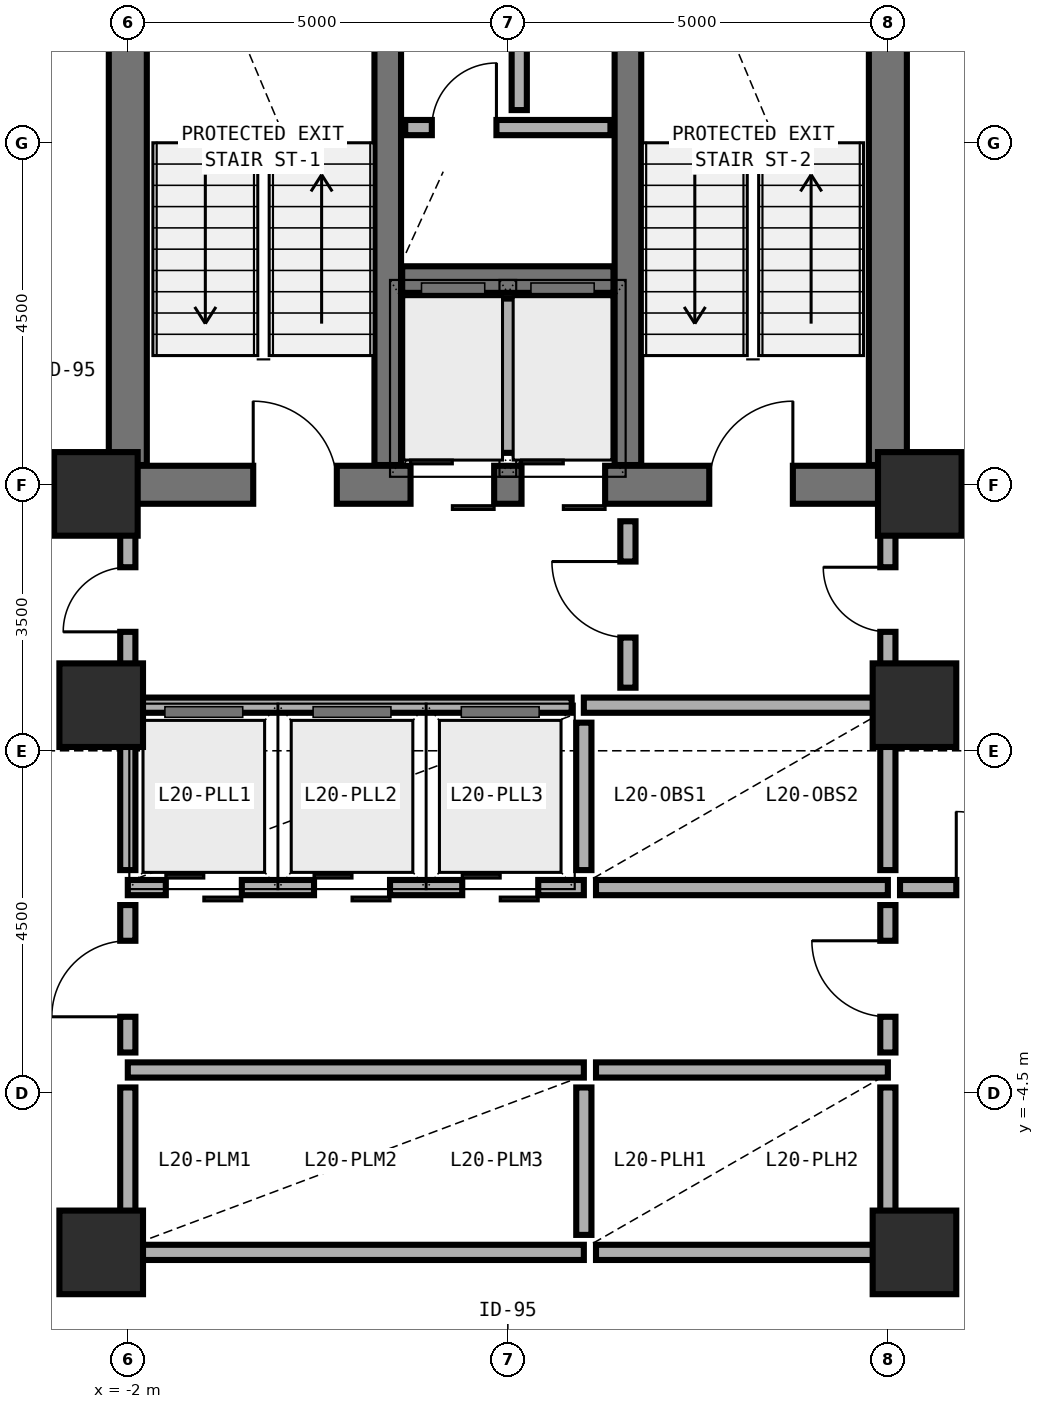
"""IFC4 building model, lengths in metres.
Left out: names, types, materials, properties, quantities, classifications, styles, units other than length and angle.
Written with IfcOpenShell. Run it as: python <this file> out.ifc"""

import sys

from ifc_helpers import new_model, si_unit, direction, frame, frame_2d, origin, origin_2d, place, context, subcontext, project, spatial, rectangle, extrude, element, fill, save


model = new_model("IFC4")
c1 = context("Model", 3, precision=1e-05, world=origin(), true_north=direction((0.0, 1.0)))
c2 = subcontext(c1, "Body", "Model", "MODEL_VIEW")
j1 = project(units=[si_unit("LENGTHUNIT", "METRE"), si_unit("PLANEANGLEUNIT", "RADIAN")], contexts=[c1])
p1 = place(None, origin())
s1 = spatial("IfcSite", under=j1, at=p1, CompositionType="ELEMENT")
p2 = place(p1, origin())
s2 = spatial("IfcBuilding", under=s1, at=p2, CompositionType="ELEMENT")
p3 = place(p2, frame((0.0, 0.0, 83.7)))
s3 = spatial("IfcBuildingStorey", under=s2, at=p3, CompositionType="ELEMENT", Elevation=83.7)
p4 = place(p3, frame((-2.0, 3.5, 0.0), z_axis=(0.0, 0.0, 1.0), x_axis=(1.0, 0.0, 0.0)))
e1 = element("IfcWall", 1, at=p4, inside=s3, PredefinedType="SHEAR", context=c2, shape_type="SweptSolid", body=[
    extrude(rectangle(XDim=10.0, YDim=0.5, at=frame_2d((5.0, 0.0))), origin(), (0.0, 0.0, 1.0), 3.892),
])
p5 = place(p4, frame((1.65, 0.0, 0.0)))
e2 = element("IfcOpeningElement", 2, at=p5, cuts=e1, PredefinedType="OPENING", context=c2, shape_type="SweptSolid", body=[
    extrude(rectangle(XDim=1.1, YDim=2.15, at=frame_2d((0.55, 1.075))), frame((0.0, 0.26, 0.0), z_axis=(0.0, -1.0, 0.0), x_axis=(1.0, 0.0, 0.0)), (0.0, 0.0, 1.0), 0.52),
])
p6 = place(p4, frame((7.65, 0.0, 0.0)))
e3 = element("IfcOpeningElement", 3, at=p6, cuts=e1, PredefinedType="OPENING", context=c2, shape_type="SweptSolid", body=[
    extrude(rectangle(XDim=1.1, YDim=2.15, at=frame_2d((0.55, 1.075))), frame((0.0, 0.26, 0.0), z_axis=(0.0, -1.0, 0.0), x_axis=(1.0, 0.0, 0.0)), (0.0, 0.0, 1.0), 0.52),
])
p7 = place(p4, frame((3.72, 0.0, 0.0)))
e4 = element("IfcOpeningElement", 4, at=p7, cuts=e1, PredefinedType="OPENING", context=c2, shape_type="SweptSolid", body=[
    extrude(rectangle(XDim=1.1, YDim=2.2, at=frame_2d((0.55, 1.1))), frame((0.0, 0.26, 0.0), z_axis=(0.0, -1.0, 0.0), x_axis=(1.0, 0.0, 0.0)), (0.0, 0.0, 1.0), 0.52),
])
p8 = place(p4, frame((5.18, 0.0, 0.0)))
e5 = element("IfcOpeningElement", 5, at=p8, cuts=e1, PredefinedType="OPENING", context=c2, shape_type="SweptSolid", body=[
    extrude(rectangle(XDim=1.1, YDim=2.2, at=frame_2d((0.55, 1.1))), frame((0.0, 0.26, 0.0), z_axis=(0.0, -1.0, 0.0), x_axis=(1.0, 0.0, 0.0)), (0.0, 0.0, 1.0), 0.52),
])
for number, where, z_axis, x_axis in (
    (6, (-2.0, 3.76, 0.0), (0.0, 0.0, 1.0), (0.0, 1.0, 0.0)),
    (7, (8.0, 3.76, 0.0), (0.0, 0.0, 1.0), (0.0, 1.0, 0.0)),
):
    element("IfcWall", number, at=place(p3, frame(where, z_axis=z_axis, x_axis=x_axis)), inside=s3, PredefinedType="SHEAR", context=c2, shape_type="SweptSolid", body=[
        extrude(rectangle(XDim=8.48, YDim=0.5, at=frame_2d((4.24, 0.0))), origin(), (0.0, 0.0, 1.0), 3.892),
    ])
for number, where, z_axis, x_axis in (
    (8, (1.42, 3.76, 0.0), (0.0, 0.0, 1.0), (0.0, 1.0, 0.0)),
    (9, (4.58, 3.76, 0.0), (0.0, 0.0, 1.0), (0.0, 1.0, 0.0)),
):
    element("IfcWall", number, at=place(p3, frame(where, z_axis=z_axis, x_axis=x_axis)), inside=s3, PredefinedType="SHEAR", context=c2, shape_type="SweptSolid", body=[
        extrude(rectangle(XDim=8.48, YDim=0.35, at=frame_2d((4.24, 0.0))), origin(), (0.0, 0.0, 1.0), 3.892),
    ])
p9 = place(p3, frame((1.61, 6.2, 0.0), z_axis=(0.0, 0.0, 1.0), x_axis=(1.0, 0.0, 0.0)))
e10 = element("IfcWall", 10, at=p9, inside=s3, PredefinedType="SHEAR", context=c2, shape_type="SweptSolid", body=[
    extrude(rectangle(XDim=2.78, YDim=0.35, at=frame_2d((1.39, 0.0))), origin(), (0.0, 0.0, 1.0), 3.892),
])
for number, where, z_axis, x_axis in (
    (11, (-2.42, 3.38, 0.0), (0.0, 0.0, 1.0), (1.0, 0.0, 0.0)),
    (12, (8.42, 3.38, 0.0), (0.0, 0.0, 1.0), (1.0, 0.0, 0.0)),
    (13, (-2.35, 0.6, 0.0), (0.0, 0.0, 1.0), (1.0, 0.0, 0.0)),
    (14, (8.35, 0.6, 0.0), (0.0, 0.0, 1.0), (1.0, 0.0, 0.0)),
    (15, (-2.35, -6.6, 0.0), (0.0, 0.0, 1.0), (1.0, 0.0, 0.0)),
    (16, (8.35, -6.6, 0.0), (0.0, 0.0, 1.0), (1.0, 0.0, 0.0)),
):
    element("IfcColumn", number, at=place(p3, frame(where, z_axis=z_axis, x_axis=x_axis)), inside=s3, PredefinedType="COLUMN", context=c2, shape_type="SweptSolid", body=[
        extrude(rectangle(XDim=1.1, YDim=1.1, at=origin_2d()), origin(), (0.0, 0.0, 1.0), 3.875),
    ])
p10 = place(p3, frame((3.0, 3.92, 0.0), z_axis=(0.0, 0.0, 1.0), x_axis=(0.0, 1.0, 0.0)))
e17 = element("IfcWall", 17, at=p10, inside=s3, PredefinedType="SOLIDWALL", context=c2, shape_type="SweptSolid", body=[
    extrude(rectangle(XDim=2.03, YDim=0.2, at=frame_2d((1.015, 0.0))), origin(), (0.0, 0.0, 1.0), 3.64),
])
p11 = place(p3, frame((4.0, 0.6, 0.0), z_axis=(0.0, 0.0, 1.0), x_axis=(1.0, 0.0, 0.0)))
e18 = element("IfcWall", 18, at=p11, inside=s3, PredefinedType="SOLIDWALL", context=c2, shape_type="SweptSolid", body=[
    extrude(rectangle(XDim=3.88, YDim=0.2, at=frame_2d((1.94, 0.0))), origin(), (0.0, 0.0, 1.0), 3.172),
])
p12 = place(p3, frame((-2.0, -1.8, 0.0), z_axis=(0.0, 0.0, 1.0), x_axis=(1.0, 0.0, 0.0)))
e19 = element("IfcWall", 19, at=p12, inside=s3, PredefinedType="SOLIDWALL", context=c2, shape_type="SweptSolid", body=[
    extrude(rectangle(XDim=6.0, YDim=0.2, at=frame_2d((3.0, 0.0))), origin(), (0.0, 0.0, 1.0), 3.64),
])
p13 = place(p12, frame((0.5, 0.0, 0.0)))
e20 = element("IfcOpeningElement", 20, at=p13, cuts=e19, PredefinedType="OPENING", context=c2, shape_type="SweptSolid", body=[
    extrude(rectangle(XDim=1.0, YDim=2.2, at=frame_2d((0.5, 1.1))), frame((0.0, 0.11, 0.0), z_axis=(0.0, -1.0, 0.0), x_axis=(1.0, 0.0, 0.0)), (0.0, 0.0, 1.0), 0.22),
])
p14 = place(p12, frame((2.45, 0.0, 0.0)))
e21 = element("IfcOpeningElement", 21, at=p14, cuts=e19, PredefinedType="OPENING", context=c2, shape_type="SweptSolid", body=[
    extrude(rectangle(XDim=1.0, YDim=2.2, at=frame_2d((0.5, 1.1))), frame((0.0, 0.11, 0.0), z_axis=(0.0, -1.0, 0.0), x_axis=(1.0, 0.0, 0.0)), (0.0, 0.0, 1.0), 0.22),
])
p15 = place(p12, frame((4.4, 0.0, 0.0)))
e22 = element("IfcOpeningElement", 22, at=p15, cuts=e19, PredefinedType="OPENING", context=c2, shape_type="SweptSolid", body=[
    extrude(rectangle(XDim=1.0, YDim=2.2, at=frame_2d((0.5, 1.1))), frame((0.0, 0.11, 0.0), z_axis=(0.0, -1.0, 0.0), x_axis=(1.0, 0.0, 0.0)), (0.0, 0.0, 1.0), 0.22),
])
p16 = place(p3, frame((-2.0, -1.57, 0.0), z_axis=(0.0, 0.0, 1.0), x_axis=(0.0, 1.0, 0.0)))
e23 = element("IfcWall", 23, at=p16, inside=s3, PredefinedType="SOLIDWALL", context=c2, shape_type="SweptSolid", body=[
    extrude(rectangle(XDim=2.05, YDim=0.2, at=frame_2d((1.025, 0.0))), origin(), (0.0, 0.0, 1.0), 3.022),
])
p17 = place(p3, frame((4.16, -1.8, 0.0), z_axis=(0.0, 0.0, 1.0), x_axis=(1.0, 0.0, 0.0)))
e24 = element("IfcWall", 24, at=p17, inside=s3, PredefinedType="SOLIDWALL", context=c2, shape_type="SweptSolid", body=[
    extrude(rectangle(XDim=3.84, YDim=0.2, at=frame_2d((1.92, 0.0))), origin(), (0.0, 0.0, 1.0), 3.64),
])
p18 = place(p3, frame((4.0, -1.57, 0.0), z_axis=(0.0, 0.0, 1.0), x_axis=(0.0, 1.0, 0.0)))
e25 = element("IfcWall", 25, at=p18, inside=s3, PredefinedType="SOLIDWALL", context=c2, shape_type="SweptSolid", body=[
    extrude(rectangle(XDim=1.94, YDim=0.2, at=frame_2d((0.97, 0.0))), origin(), (0.0, 0.0, 1.0), 3.64),
])
p19 = place(p3, frame((8.0, -1.57, 0.0), z_axis=(0.0, 0.0, 1.0), x_axis=(0.0, 1.0, 0.0)))
e26 = element("IfcWall", 26, at=p19, inside=s3, PredefinedType="SOLIDWALL", context=c2, shape_type="SweptSolid", body=[
    extrude(rectangle(XDim=2.05, YDim=0.2, at=frame_2d((1.025, 0.0))), origin(), (0.0, 0.0, 1.0), 3.072),
])
p20 = place(p3, frame((-2.0, -4.2, 0.0), z_axis=(0.0, 0.0, 1.0), x_axis=(1.0, 0.0, 0.0)))
e27 = element("IfcWall", 27, at=p20, inside=s3, PredefinedType="SOLIDWALL", context=c2, shape_type="SweptSolid", body=[
    extrude(rectangle(XDim=6.0, YDim=0.2, at=frame_2d((3.0, 0.0))), origin(), (0.0, 0.0, 1.0), 3.64),
])
p21 = place(p3, frame((-2.0, -6.6, 0.0), z_axis=(0.0, 0.0, 1.0), x_axis=(1.0, 0.0, 0.0)))
e28 = element("IfcWall", 28, at=p21, inside=s3, PredefinedType="SOLIDWALL", context=c2, shape_type="SweptSolid", body=[
    extrude(rectangle(XDim=6.0, YDim=0.2, at=frame_2d((3.0, 0.0))), origin(), (0.0, 0.0, 1.0), 3.172),
])
p22 = place(p3, frame((-2.0, -6.37, 0.0), z_axis=(0.0, 0.0, 1.0), x_axis=(0.0, 1.0, 0.0)))
e29 = element("IfcWall", 29, at=p22, inside=s3, PredefinedType="SOLIDWALL", context=c2, shape_type="SweptSolid", body=[
    extrude(rectangle(XDim=1.94, YDim=0.2, at=frame_2d((0.97, 0.0))), origin(), (0.0, 0.0, 1.0), 3.022),
])
p23 = place(p3, frame((4.16, -4.2, 0.0), z_axis=(0.0, 0.0, 1.0), x_axis=(1.0, 0.0, 0.0)))
e30 = element("IfcWall", 30, at=p23, inside=s3, PredefinedType="SOLIDWALL", context=c2, shape_type="SweptSolid", body=[
    extrude(rectangle(XDim=3.84, YDim=0.2, at=frame_2d((1.92, 0.0))), origin(), (0.0, 0.0, 1.0), 3.64),
])
p24 = place(p3, frame((4.16, -6.6, 0.0), z_axis=(0.0, 0.0, 1.0), x_axis=(1.0, 0.0, 0.0)))
e31 = element("IfcWall", 31, at=p24, inside=s3, PredefinedType="SOLIDWALL", context=c2, shape_type="SweptSolid", body=[
    extrude(rectangle(XDim=3.84, YDim=0.2, at=frame_2d((1.92, 0.0))), origin(), (0.0, 0.0, 1.0), 3.172),
])
p25 = place(p3, frame((4.0, -6.37, 0.0), z_axis=(0.0, 0.0, 1.0), x_axis=(0.0, 1.0, 0.0)))
e32 = element("IfcWall", 32, at=p25, inside=s3, PredefinedType="SOLIDWALL", context=c2, shape_type="SweptSolid", body=[
    extrude(rectangle(XDim=1.94, YDim=0.2, at=frame_2d((0.97, 0.0))), origin(), (0.0, 0.0, 1.0), 3.64),
])
p26 = place(p3, frame((8.0, -6.37, 0.0), z_axis=(0.0, 0.0, 1.0), x_axis=(0.0, 1.0, 0.0)))
e33 = element("IfcWall", 33, at=p26, inside=s3, PredefinedType="SOLIDWALL", context=c2, shape_type="SweptSolid", body=[
    extrude(rectangle(XDim=1.94, YDim=0.2, at=frame_2d((0.97, 0.0))), origin(), (0.0, 0.0, 1.0), 3.072),
])
p27 = place(p3, frame((1.65, 8.2, 0.0), z_axis=(0.0, 0.0, 1.0), x_axis=(1.0, 0.0, 0.0)))
e34 = element("IfcWall", 34, at=p27, inside=s3, PredefinedType="MOVABLE", context=c2, shape_type="SweptSolid", body=[
    extrude(rectangle(XDim=2.7, YDim=0.2, at=frame_2d((1.35, 0.0))), origin(), (0.0, 0.0, 1.0), 3.64),
])
p28 = place(p27, frame((0.35, 0.0, 0.0)))
e35 = element("IfcOpeningElement", 35, at=p28, cuts=e34, PredefinedType="OPENING", context=c2, shape_type="SweptSolid", body=[
    extrude(rectangle(XDim=0.85, YDim=2.1, at=frame_2d((0.425, 1.05))), frame((0.0, 0.11, 0.0), z_axis=(0.0, -1.0, 0.0), x_axis=(1.0, 0.0, 0.0)), (0.0, 0.0, 1.0), 0.22),
])
p29 = place(p3, frame((3.15, 8.43, 0.0), z_axis=(0.0, 0.0, 1.0), x_axis=(0.0, 1.0, 0.0)))
e36 = element("IfcWall", 36, at=p29, inside=s3, PredefinedType="MOVABLE", context=c2, shape_type="SweptSolid", body=[
    extrude(rectangle(XDim=3.67, YDim=0.2, at=frame_2d((1.835, 0.0))), origin(), (0.0, 0.0, 1.0), 3.64),
])
p30 = place(p29, frame((1.34, 0.0, 0.0)))
e37 = element("IfcOpeningElement", 37, at=p30, cuts=e36, PredefinedType="OPENING", context=c2, shape_type="SweptSolid", body=[
    extrude(rectangle(XDim=0.85, YDim=2.1, at=frame_2d((0.425, 1.05))), frame((0.0, 0.11, 0.0), z_axis=(0.0, -1.0, 0.0), x_axis=(1.0, 0.0, 0.0)), (0.0, 0.0, 1.0), 0.22),
])
p31 = place(p3, frame((4.58, 0.83, 0.0), z_axis=(0.0, 0.0, 1.0), x_axis=(0.0, 1.0, 0.0)))
e38 = element("IfcWall", 38, at=p31, inside=s3, PredefinedType="MOVABLE", context=c2, shape_type="SweptSolid", body=[
    extrude(rectangle(XDim=2.19, YDim=0.2, at=frame_2d((1.095, 0.0))), origin(), (0.0, 0.0, 1.0), 3.64),
])
p32 = place(p31, frame((0.66, 0.0, 0.0)))
e39 = element("IfcOpeningElement", 39, at=p32, cuts=e38, PredefinedType="OPENING", context=c2, shape_type="SweptSolid", body=[
    extrude(rectangle(XDim=1.0, YDim=2.1, at=frame_2d((0.5, 1.05))), frame((0.0, 0.11, 0.0), z_axis=(0.0, -1.0, 0.0), x_axis=(1.0, 0.0, 0.0)), (0.0, 0.0, 1.0), 0.22),
])
p33 = place(p3, frame((-2.0, 0.72, 0.0), z_axis=(0.0, 0.0, 1.0), x_axis=(0.0, 1.0, 0.0)))
e40 = element("IfcWall", 40, at=p33, inside=s3, PredefinedType="MOVABLE", context=c2, shape_type="SweptSolid", body=[
    extrude(rectangle(XDim=2.3, YDim=0.2, at=frame_2d((1.15, 0.0))), origin(), (0.0, 0.0, 1.0), 2.872),
])
p34 = place(p33, frame((0.845, 0.0, 0.0)))
e41 = element("IfcOpeningElement", 41, at=p34, cuts=e40, PredefinedType="OPENING", context=c2, shape_type="SweptSolid", body=[
    extrude(rectangle(XDim=0.85, YDim=2.1, at=frame_2d((0.425, 1.05))), frame((0.0, 0.11, 0.0), z_axis=(0.0, -1.0, 0.0), x_axis=(1.0, 0.0, 0.0)), (0.0, 0.0, 1.0), 0.22),
])
p35 = place(p3, frame((8.0, 0.72, 0.0), z_axis=(0.0, 0.0, 1.0), x_axis=(0.0, 1.0, 0.0)))
e42 = element("IfcWall", 42, at=p35, inside=s3, PredefinedType="MOVABLE", context=c2, shape_type="SweptSolid", body=[
    extrude(rectangle(XDim=2.3, YDim=0.2, at=frame_2d((1.15, 0.0))), origin(), (0.0, 0.0, 1.0), 2.872),
])
p36 = place(p35, frame((0.845, 0.0, 0.0)))
e43 = element("IfcOpeningElement", 43, at=p36, cuts=e42, PredefinedType="OPENING", context=c2, shape_type="SweptSolid", body=[
    extrude(rectangle(XDim=0.85, YDim=2.1, at=frame_2d((0.425, 1.05))), frame((0.0, 0.11, 0.0), z_axis=(0.0, -1.0, 0.0), x_axis=(1.0, 0.0, 0.0)), (0.0, 0.0, 1.0), 0.22),
])
p37 = place(p3, frame((-2.0, -3.97, 0.0), z_axis=(0.0, 0.0, 1.0), x_axis=(0.0, 1.0, 0.0)))
e44 = element("IfcWall", 44, at=p37, inside=s3, PredefinedType="MOVABLE", context=c2, shape_type="SweptSolid", body=[
    extrude(rectangle(XDim=1.94, YDim=0.2, at=frame_2d((0.97, 0.0))), origin(), (0.0, 0.0, 1.0), 3.022),
])
p38 = place(p37, frame((0.47, 0.0, 0.0)))
e45 = element("IfcOpeningElement", 45, at=p38, cuts=e44, PredefinedType="OPENING", context=c2, shape_type="SweptSolid", body=[
    extrude(rectangle(XDim=1.0, YDim=2.1, at=frame_2d((0.5, 1.05))), frame((0.0, 0.11, 0.0), z_axis=(0.0, -1.0, 0.0), x_axis=(1.0, 0.0, 0.0)), (0.0, 0.0, 1.0), 0.22),
])
p39 = place(p3, frame((8.0, -3.97, 0.0), z_axis=(0.0, 0.0, 1.0), x_axis=(0.0, 1.0, 0.0)))
e46 = element("IfcWall", 46, at=p39, inside=s3, PredefinedType="MOVABLE", context=c2, shape_type="SweptSolid", body=[
    extrude(rectangle(XDim=1.94, YDim=0.2, at=frame_2d((0.97, 0.0))), origin(), (0.0, 0.0, 1.0), 3.072),
])
p40 = place(p39, frame((0.47, 0.0, 0.0)))
e47 = element("IfcOpeningElement", 47, at=p40, cuts=e46, PredefinedType="OPENING", context=c2, shape_type="SweptSolid", body=[
    extrude(rectangle(XDim=1.0, YDim=2.1, at=frame_2d((0.5, 1.05))), frame((0.0, 0.11, 0.0), z_axis=(0.0, -1.0, 0.0), x_axis=(1.0, 0.0, 0.0)), (0.0, 0.0, 1.0), 0.22),
])
p41 = place(p3, frame((8.16, -1.8, 0.0), z_axis=(0.0, 0.0, 1.0), x_axis=(1.0, 0.0, 0.0)))
e48 = element("IfcWall", 48, at=p41, inside=s3, PredefinedType="MOVABLE", context=c2, shape_type="SweptSolid", body=[
    extrude(rectangle(XDim=2.64, YDim=0.2, at=frame_2d((1.32, 0.0))), origin(), (0.0, 0.0, 1.0), 3.64),
])
p42 = place(p41, frame((0.74, 0.0, 0.0)))
e49 = element("IfcOpeningElement", 49, at=p42, cuts=e48, PredefinedType="OPENING", context=c2, shape_type="SweptSolid", body=[
    extrude(rectangle(XDim=1.0, YDim=2.1, at=frame_2d((0.5, 1.05))), frame((0.0, 0.11, 0.0), z_axis=(0.0, -1.0, 0.0), x_axis=(1.0, 0.0, 0.0)), (0.0, 0.0, 1.0), 0.22),
])
p43 = place(p3, frame((-1.88, 0.6, 0.0), z_axis=(0.0, 0.0, 1.0), x_axis=(1.0, 0.0, 0.0)))
e50 = element("IfcWall", 50, at=p43, inside=s3, PredefinedType="MOVABLE", context=c2, shape_type="SweptSolid", body=[
    extrude(rectangle(XDim=5.72, YDim=0.2, at=frame_2d((2.86, 0.0))), origin(), (0.0, 0.0, 1.0), 3.172),
])
p44 = place(p5, origin())
e51 = element("IfcDoor", 51, at=p44, inside=s3, OperationType="SINGLE_SWING_LEFT", PredefinedType="DOOR", context=c2, shape_type="SweptSolid", body=[
    extrude(rectangle(XDim=1.1, YDim=2.15, at=frame_2d((0.55, 1.075))), frame((0.0, 0.025, 0.0), z_axis=(0.0, -1.0, 0.0), x_axis=(1.0, 0.0, 0.0)), (0.0, 0.0, 1.0), 0.05),
])
fill(e2, e51)
p45 = place(p6, origin())
e52 = element("IfcDoor", 52, at=p45, inside=s3, OperationType="SINGLE_SWING_RIGHT", PredefinedType="DOOR", context=c2, shape_type="SweptSolid", body=[
    extrude(rectangle(XDim=1.1, YDim=2.15, at=frame_2d((0.55, 1.075))), frame((0.0, 0.025, 0.0), z_axis=(0.0, -1.0, 0.0), x_axis=(1.0, 0.0, 0.0)), (0.0, 0.0, 1.0), 0.05),
])
fill(e3, e52)
p46 = place(p7, origin())
e53 = element("IfcDoor", 53, at=p46, inside=s3, OperationType="DOUBLE_DOOR_SLIDING", PredefinedType="DOOR", context=c2, shape_type="SweptSolid", body=[
    extrude(rectangle(XDim=1.1, YDim=2.2, at=frame_2d((0.55, 1.1))), frame((0.0, 0.025, 0.0), z_axis=(0.0, -1.0, 0.0), x_axis=(1.0, 0.0, 0.0)), (0.0, 0.0, 1.0), 0.05),
])
fill(e4, e53)
p47 = place(p8, origin())
e54 = element("IfcDoor", 54, at=p47, inside=s3, OperationType="DOUBLE_DOOR_SLIDING", PredefinedType="DOOR", context=c2, shape_type="SweptSolid", body=[
    extrude(rectangle(XDim=1.1, YDim=2.2, at=frame_2d((0.55, 1.1))), frame((0.0, 0.025, 0.0), z_axis=(0.0, -1.0, 0.0), x_axis=(1.0, 0.0, 0.0)), (0.0, 0.0, 1.0), 0.05),
])
fill(e5, e54)
p48 = place(p28, origin())
e55 = element("IfcDoor", 55, at=p48, inside=s3, OperationType="SINGLE_SWING_RIGHT", PredefinedType="DOOR", context=c2, shape_type="SweptSolid", body=[
    extrude(rectangle(XDim=0.85, YDim=2.1, at=frame_2d((0.425, 1.05))), frame((0.0, 0.025, 0.0), z_axis=(0.0, -1.0, 0.0), x_axis=(1.0, 0.0, 0.0)), (0.0, 0.0, 1.0), 0.05),
])
fill(e35, e55)
p49 = place(p32, origin())
e56 = element("IfcDoor", 56, at=p49, inside=s3, OperationType="SINGLE_SWING_RIGHT", PredefinedType="DOOR", context=c2, shape_type="SweptSolid", body=[
    extrude(rectangle(XDim=1.0, YDim=2.1, at=frame_2d((0.5, 1.05))), frame((0.0, 0.025, 0.0), z_axis=(0.0, -1.0, 0.0), x_axis=(1.0, 0.0, 0.0)), (0.0, 0.0, 1.0), 0.05),
])
fill(e39, e56)
p50 = place(p34, origin())
e57 = element("IfcDoor", 57, at=p50, inside=s3, OperationType="SINGLE_SWING_LEFT", PredefinedType="DOOR", context=c2, shape_type="SweptSolid", body=[
    extrude(rectangle(XDim=0.85, YDim=2.1, at=frame_2d((0.425, 1.05))), frame((0.0, 0.025, 0.0), z_axis=(0.0, -1.0, 0.0), x_axis=(1.0, 0.0, 0.0)), (0.0, 0.0, 1.0), 0.05),
])
fill(e41, e57)
p51 = place(p36, origin())
e58 = element("IfcDoor", 58, at=p51, inside=s3, OperationType="SINGLE_SWING_RIGHT", PredefinedType="DOOR", context=c2, shape_type="SweptSolid", body=[
    extrude(rectangle(XDim=0.85, YDim=2.1, at=frame_2d((0.425, 1.05))), frame((0.0, 0.025, 0.0), z_axis=(0.0, -1.0, 0.0), x_axis=(1.0, 0.0, 0.0)), (0.0, 0.0, 1.0), 0.05),
])
fill(e43, e58)
p52 = place(p38, origin())
e59 = element("IfcDoor", 59, at=p52, inside=s3, OperationType="SINGLE_SWING_LEFT", PredefinedType="DOOR", context=c2, shape_type="SweptSolid", body=[
    extrude(rectangle(XDim=1.0, YDim=2.1, at=frame_2d((0.5, 1.05))), frame((0.0, 0.025, 0.0), z_axis=(0.0, -1.0, 0.0), x_axis=(1.0, 0.0, 0.0)), (0.0, 0.0, 1.0), 0.05),
])
fill(e45, e59)
p53 = place(p40, origin())
e60 = element("IfcDoor", 60, at=p53, inside=s3, OperationType="SINGLE_SWING_RIGHT", PredefinedType="DOOR", context=c2, shape_type="SweptSolid", body=[
    extrude(rectangle(XDim=1.0, YDim=2.1, at=frame_2d((0.5, 1.05))), frame((0.0, 0.025, 0.0), z_axis=(0.0, -1.0, 0.0), x_axis=(1.0, 0.0, 0.0)), (0.0, 0.0, 1.0), 0.05),
])
fill(e47, e60)
p54 = place(p42, origin())
e61 = element("IfcDoor", 61, at=p54, inside=s3, OperationType="SINGLE_SWING_LEFT", PredefinedType="DOOR", context=c2, shape_type="SweptSolid", body=[
    extrude(rectangle(XDim=1.0, YDim=2.1, at=frame_2d((0.5, 1.05))), frame((0.0, 0.025, 0.0), z_axis=(0.0, -1.0, 0.0), x_axis=(1.0, 0.0, 0.0)), (0.0, 0.0, 1.0), 0.05),
])
fill(e49, e61)
p55 = place(p13, origin())
e62 = element("IfcDoor", 62, at=p55, inside=s3, OperationType="DOUBLE_DOOR_SLIDING", PredefinedType="DOOR", context=c2, shape_type="SweptSolid", body=[
    extrude(rectangle(XDim=1.0, YDim=2.2, at=frame_2d((0.5, 1.1))), frame((0.0, 0.025, 0.0), z_axis=(0.0, -1.0, 0.0), x_axis=(1.0, 0.0, 0.0)), (0.0, 0.0, 1.0), 0.05),
])
fill(e20, e62)
p56 = place(p14, origin())
e63 = element("IfcDoor", 63, at=p56, inside=s3, OperationType="DOUBLE_DOOR_SLIDING", PredefinedType="DOOR", context=c2, shape_type="SweptSolid", body=[
    extrude(rectangle(XDim=1.0, YDim=2.2, at=frame_2d((0.5, 1.1))), frame((0.0, 0.025, 0.0), z_axis=(0.0, -1.0, 0.0), x_axis=(1.0, 0.0, 0.0)), (0.0, 0.0, 1.0), 0.05),
])
fill(e21, e63)
p57 = place(p15, origin())
e64 = element("IfcDoor", 64, at=p57, inside=s3, OperationType="DOUBLE_DOOR_SLIDING", PredefinedType="DOOR", context=c2, shape_type="SweptSolid", body=[
    extrude(rectangle(XDim=1.0, YDim=2.2, at=frame_2d((0.5, 1.1))), frame((0.0, 0.025, 0.0), z_axis=(0.0, -1.0, 0.0), x_axis=(1.0, 0.0, 0.0)), (0.0, 0.0, 1.0), 0.05),
])
fill(e22, e64)
save(model, sys.argv[1])
